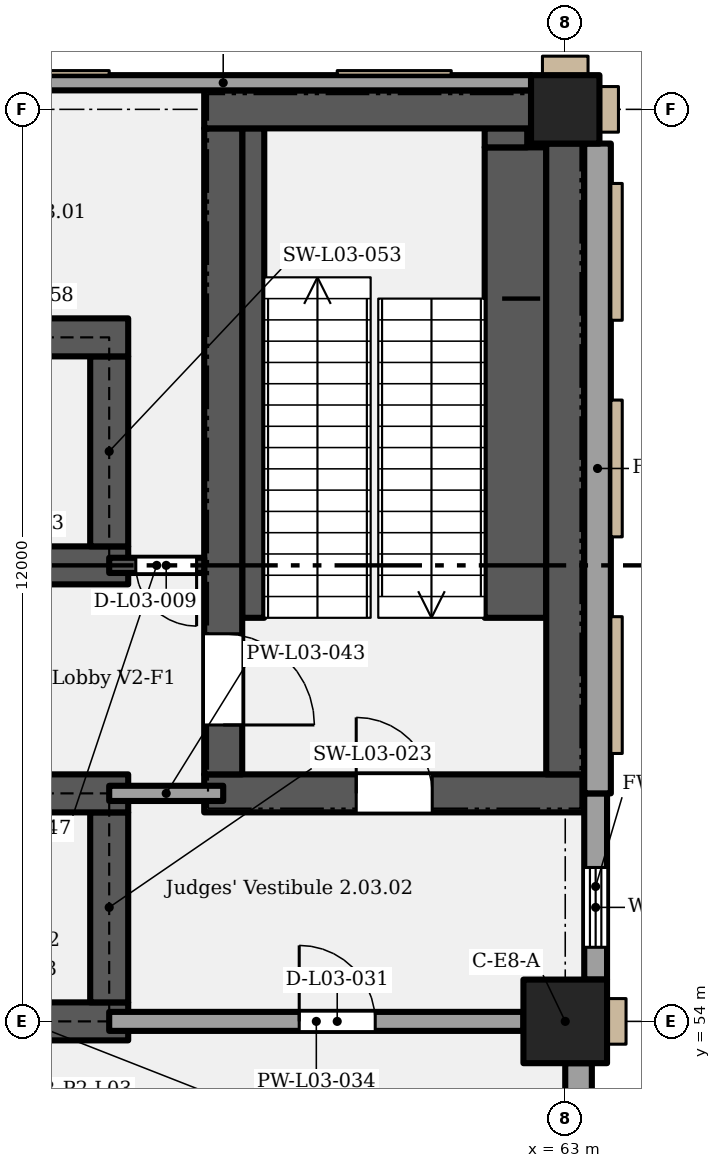
"""IFC4 building model, lengths in metres.
Left out: names, types, materials, properties, quantities, classifications, styles, units other than length and angle.
Written with IfcOpenShell. Run it as: python <this file> out.ifc"""

import sys

from ifc_helpers import new_model, si_unit, direction, frame, frame_2d, origin, origin_2d, place, context, subcontext, project, spatial, rectangle, extrude, element, fill, save


model = new_model("IFC4")
c1 = context("Model", 3, precision=1e-05, world=origin(), true_north=direction((0.0, 1.0)))
c2 = subcontext(c1, "Body", "Model", "MODEL_VIEW")
j1 = project(units=[si_unit("LENGTHUNIT", "METRE"), si_unit("PLANEANGLEUNIT", "RADIAN")], contexts=[c1])
p1 = place(None, origin())
s1 = spatial("IfcSite", under=j1, at=p1, CompositionType="ELEMENT")
p2 = place(p1, origin())
s2 = spatial("IfcBuilding", under=s1, at=p2, CompositionType="ELEMENT")
p3 = place(p2, frame((0.0, 0.0, 17.4)))
s3 = spatial("IfcBuildingStorey", under=s2, at=p3, CompositionType="ELEMENT", Elevation=17.4)
p4 = place(p3, frame((63.0, 54.0, 0.0), z_axis=(0.0, 0.0, 1.0), x_axis=(1.0, 0.0, 0.0)))
e1 = element("IfcColumn", 1, at=p4, inside=s3, PredefinedType="COLUMN", context=c2, shape_type="SweptSolid", body=[
    extrude(rectangle(XDim=1.1, YDim=1.1, at=origin_2d()), origin(), (0.0, 0.0, 1.0), 5.4),
])
p5 = place(p3, frame((63.0, 66.0, 0.0), z_axis=(0.0, 0.0, 1.0), x_axis=(1.0, 0.0, 0.0)))
e2 = element("IfcColumn", 2, at=p5, inside=s3, PredefinedType="COLUMN", context=c2, shape_type="SweptSolid", body=[
    extrude(rectangle(XDim=0.9, YDim=0.9, at=origin_2d()), origin(), (0.0, 0.0, 1.0), 5.4),
])
p6 = place(p3, frame((54.55, 54.0, 0.0), z_axis=(0.0, 0.0, 1.0), x_axis=(1.0, 0.0, 0.0)))
e3 = element("IfcWall", 3, at=p6, inside=s3, PredefinedType="SHEAR", context=c2, shape_type="SweptSolid", body=[
    extrude(rectangle(XDim=2.7, YDim=0.5, at=frame_2d((1.35, 0.0))), origin(), (0.0, 0.0, 1.0), 5.15),
])
p7 = place(p3, frame((57.0, 54.25, 0.0), z_axis=(0.0, 0.0, 1.0), x_axis=(0.0, 1.0, 0.0)))
e4 = element("IfcWall", 4, at=p7, inside=s3, PredefinedType="SHEAR", context=c2, shape_type="SweptSolid", body=[
    extrude(rectangle(XDim=2.5, YDim=0.5, at=frame_2d((1.25, 0.0))), origin(), (0.0, 0.0, 1.0), 5.15),
])
p8 = place(p3, frame((46.25, 57.0, 0.0), z_axis=(0.0, 0.0, 1.0), x_axis=(1.0, 0.0, 0.0)))
e5 = element("IfcWall", 5, at=p8, inside=s3, PredefinedType="SHEAR", context=c2, shape_type="SweptSolid", body=[
    extrude(rectangle(XDim=11.0, YDim=0.5, at=frame_2d((5.5, 0.0))), origin(), (0.0, 0.0, 1.0), 5.15),
])
p9 = place(p8, frame((4.9, 0.0, 0.0)))
e6 = element("IfcOpeningElement", 6, at=p9, cuts=e5, PredefinedType="OPENING", context=c2, shape_type="SweptSolid", body=[
    extrude(rectangle(XDim=1.2, YDim=2.1, at=frame_2d((0.6, 1.05))), frame((0.0, 0.26, 0.0), z_axis=(0.0, -1.0, 0.0), x_axis=(1.0, 0.0, 0.0)), (0.0, 0.0, 1.0), 0.52),
])
p10 = place(p3, frame((58.25, 57.0, 0.0), z_axis=(0.0, 0.0, 1.0), x_axis=(1.0, 0.0, 0.0)))
e7 = element("IfcWall", 7, at=p10, inside=s3, PredefinedType="SHEAR", context=c2, shape_type="SweptSolid", body=[
    extrude(rectangle(XDim=5.0, YDim=0.5, at=frame_2d((2.5, 0.0))), origin(), (0.0, 0.0, 1.0), 5.15),
])
p11 = place(p10, frame((2.0, 0.0, 0.0)))
e8 = element("IfcOpeningElement", 8, at=p11, cuts=e7, PredefinedType="OPENING", context=c2, shape_type="SweptSolid", body=[
    extrude(rectangle(XDim=1.0, YDim=2.1, at=frame_2d((0.5, 1.05))), frame((0.0, 0.26, 0.0), z_axis=(0.0, -1.0, 0.0), x_axis=(1.0, 0.0, 0.0)), (0.0, 0.0, 1.0), 0.52),
])
p12 = place(p3, frame((58.5, 57.25, 0.0), z_axis=(0.0, 0.0, 1.0), x_axis=(0.0, 1.0, 0.0)))
e9 = element("IfcWall", 9, at=p12, inside=s3, PredefinedType="SHEAR", context=c2, shape_type="SweptSolid", body=[
    extrude(rectangle(XDim=8.5, YDim=0.5, at=frame_2d((4.25, 0.0))), origin(), (0.0, 0.0, 1.0), 5.15),
])
p13 = place(p12, frame((1.85, 0.0, 0.0), z_axis=(0.0, 0.0, 1.0), x_axis=(-1.0, 0.0, 0.0)))
e10 = element("IfcOpeningElement", 10, at=p13, cuts=e9, PredefinedType="OPENING", context=c2, shape_type="SweptSolid", body=[
    extrude(rectangle(XDim=1.2, YDim=2.1, at=frame_2d((0.6, 1.05))), frame((0.0, 0.26, 0.0), z_axis=(0.0, -1.0, 0.0), x_axis=(1.0, 0.0, 0.0)), (0.0, 0.0, 1.0), 0.52),
])
p14 = place(p3, frame((63.0, 57.25, 0.0), z_axis=(0.0, 0.0, 1.0), x_axis=(0.0, 1.0, 0.0)))
e11 = element("IfcWall", 11, at=p14, inside=s3, PredefinedType="SHEAR", context=c2, shape_type="SweptSolid", body=[
    extrude(rectangle(XDim=8.3, YDim=0.5, at=frame_2d((4.15, 0.0))), origin(), (0.0, 0.0, 1.0), 5.15),
])
p15 = place(p3, frame((54.25, 60.0, 0.0), z_axis=(0.0, 0.0, 1.0), x_axis=(1.0, 0.0, 0.0)))
e12 = element("IfcWall", 12, at=p15, inside=s3, PredefinedType="SHEAR", context=c2, shape_type="SweptSolid", body=[
    extrude(rectangle(XDim=3.0, YDim=0.5, at=frame_2d((1.5, 0.0))), origin(), (0.0, 0.0, 1.0), 5.15),
])
p16 = place(p15, frame((0.7, 0.0, 0.0)))
e13 = element("IfcOpeningElement", 13, at=p16, cuts=e12, PredefinedType="OPENING", context=c2, shape_type="SweptSolid", body=[
    extrude(rectangle(XDim=1.1, YDim=2.1, at=frame_2d((0.55, 1.05))), frame((0.0, 0.26, 0.0), z_axis=(0.0, -1.0, 0.0), x_axis=(1.0, 0.0, 0.0)), (0.0, 0.0, 1.0), 0.52),
])
p17 = place(p3, frame((57.0, 60.25, 0.0), z_axis=(0.0, 0.0, 1.0), x_axis=(0.0, 1.0, 0.0)))
e14 = element("IfcWall", 14, at=p17, inside=s3, PredefinedType="SHEAR", context=c2, shape_type="SweptSolid", body=[
    extrude(rectangle(XDim=2.5, YDim=0.5, at=frame_2d((1.25, 0.0))), origin(), (0.0, 0.0, 1.0), 5.15),
])
p18 = place(p3, frame((54.25, 63.0, 0.0), z_axis=(0.0, 0.0, 1.0), x_axis=(1.0, 0.0, 0.0)))
e15 = element("IfcWall", 15, at=p18, inside=s3, PredefinedType="SHEAR", context=c2, shape_type="SweptSolid", body=[
    extrude(rectangle(XDim=3.0, YDim=0.5, at=frame_2d((1.5, 0.0))), origin(), (0.0, 0.0, 1.0), 5.15),
])
p19 = place(p3, frame((58.25, 66.0, 0.0), z_axis=(0.0, 0.0, 1.0), x_axis=(1.0, 0.0, 0.0)))
e16 = element("IfcWall", 16, at=p19, inside=s3, PredefinedType="SHEAR", context=c2, shape_type="SweptSolid", body=[
    extrude(rectangle(XDim=4.3, YDim=0.5, at=frame_2d((2.15, 0.0))), origin(), (0.0, 0.0, 1.0), 5.15),
])
p20 = place(p3, frame((54.45, 66.35, 0.0), z_axis=(0.0, 0.0, 1.0), x_axis=(1.0, 0.0, 0.0)))
e17 = element("IfcWall", 17, at=p20, inside=s3, PredefinedType="SOLIDWALL", context=c2, shape_type="SweptSolid", body=[
    extrude(rectangle(XDim=8.1, YDim=0.2, at=frame_2d((4.05, 0.0))), origin(), (0.0, 0.0, 1.0), 5.15),
])
p21 = place(p3, frame((63.175, 38.05, 0.0), z_axis=(0.0, 0.0, 1.0), x_axis=(0.0, 1.0, 0.0)))
e18 = element("IfcWall", 18, at=p21, inside=s3, PredefinedType="SOLIDWALL", context=c2, shape_type="SweptSolid", body=[
    extrude(rectangle(XDim=15.4, YDim=0.35, at=frame_2d((7.7, 0.0))), origin(), (0.0, 0.0, 1.0), 5.15),
])
p22 = place(p21, frame((0.35, 0.0, 1.05)))
e19 = element("IfcOpeningElement", 19, at=p22, cuts=e18, PredefinedType="OPENING", context=c2, shape_type="SweptSolid", body=[
    extrude(rectangle(XDim=1.5, YDim=3.5, at=frame_2d((0.75, 1.75))), frame((0.0, 0.185, 0.0), z_axis=(0.0, -1.0, 0.0), x_axis=(1.0, 0.0, 0.0)), (0.0, 0.0, 1.0), 0.37),
])
p23 = place(p21, frame((3.65, 0.0, 1.05)))
e20 = element("IfcOpeningElement", 20, at=p23, cuts=e18, PredefinedType="OPENING", context=c2, shape_type="SweptSolid", body=[
    extrude(rectangle(XDim=1.5, YDim=3.5, at=frame_2d((0.75, 1.75))), frame((0.0, 0.185, 0.0), z_axis=(0.0, -1.0, 0.0), x_axis=(1.0, 0.0, 0.0)), (0.0, 0.0, 1.0), 0.37),
])
p24 = place(p21, frame((6.95, 0.0, 1.05)))
e21 = element("IfcOpeningElement", 21, at=p24, cuts=e18, PredefinedType="OPENING", context=c2, shape_type="SweptSolid", body=[
    extrude(rectangle(XDim=1.5, YDim=3.5, at=frame_2d((0.75, 1.75))), frame((0.0, 0.185, 0.0), z_axis=(0.0, -1.0, 0.0), x_axis=(1.0, 0.0, 0.0)), (0.0, 0.0, 1.0), 0.37),
])
p25 = place(p21, frame((10.25, 0.0, 1.05)))
e22 = element("IfcOpeningElement", 22, at=p25, cuts=e18, PredefinedType="OPENING", context=c2, shape_type="SweptSolid", body=[
    extrude(rectangle(XDim=1.5, YDim=3.5, at=frame_2d((0.75, 1.75))), frame((0.0, 0.185, 0.0), z_axis=(0.0, -1.0, 0.0), x_axis=(1.0, 0.0, 0.0)), (0.0, 0.0, 1.0), 0.37),
])
p26 = place(p21, frame((13.55, 0.0, 1.05)))
e23 = element("IfcOpeningElement", 23, at=p26, cuts=e18, PredefinedType="OPENING", context=c2, shape_type="SweptSolid", body=[
    extrude(rectangle(XDim=1.5, YDim=3.5, at=frame_2d((0.75, 1.75))), frame((0.0, 0.185, 0.0), z_axis=(0.0, -1.0, 0.0), x_axis=(1.0, 0.0, 0.0)), (0.0, 0.0, 1.0), 0.37),
])
p27 = place(p3, frame((63.4, 54.55, 0.0), z_axis=(0.0, 0.0, 1.0), x_axis=(0.0, 1.0, 0.0)))
e24 = element("IfcWall", 24, at=p27, inside=s3, PredefinedType="SOLIDWALL", context=c2, shape_type="SweptSolid", body=[
    extrude(rectangle(XDim=2.45, YDim=0.3, at=frame_2d((1.225, 0.0))), origin(), (0.0, 0.0, 1.0), 5.15),
])
p28 = place(p27, frame((0.425, 0.0, 1.05)))
e25 = element("IfcOpeningElement", 25, at=p28, cuts=e24, PredefinedType="OPENING", context=c2, shape_type="SweptSolid", body=[
    extrude(rectangle(XDim=1.05, YDim=2.4, at=frame_2d((0.525, 1.2))), frame((0.0, 0.16, 0.0), z_axis=(0.0, -1.0, 0.0), x_axis=(1.0, 0.0, 0.0)), (0.0, 0.0, 1.0), 0.32),
])
p29 = place(p3, frame((63.425, 57.0, 0.0), z_axis=(0.0, 0.0, 1.0), x_axis=(0.0, 1.0, 0.0)))
e26 = element("IfcWall", 26, at=p29, inside=s3, PredefinedType="SOLIDWALL", context=c2, shape_type="SweptSolid", body=[
    extrude(rectangle(XDim=8.55, YDim=0.35, at=frame_2d((4.275, 0.0))), origin(), (0.0, 0.0, 1.0), 5.15),
])
p30 = place(p3, frame((57.0, 54.0, 0.0), z_axis=(0.0, 0.0, 1.0), x_axis=(1.0, 0.0, 0.0)))
e27 = element("IfcWall", 27, at=p30, inside=s3, PredefinedType="PARTITIONING", context=c2, shape_type="SweptSolid", body=[
    extrude(rectangle(XDim=5.45, YDim=0.25, at=frame_2d((2.725, 0.0))), origin(), (0.0, 0.0, 1.0), 4.4),
])
p31 = place(p30, frame((2.5, 0.0, 0.0)))
e28 = element("IfcOpeningElement", 28, at=p31, cuts=e27, PredefinedType="OPENING", context=c2, shape_type="SweptSolid", body=[
    extrude(rectangle(XDim=1.0, YDim=2.1, at=frame_2d((0.5, 1.05))), frame((0.0, 0.135, 0.0), z_axis=(0.0, -1.0, 0.0), x_axis=(1.0, 0.0, 0.0)), (0.0, 0.0, 1.0), 0.27),
])
p32 = place(p3, frame((57.0, 57.0, 0.0), z_axis=(0.0, 0.0, 1.0), x_axis=(1.0, 0.0, 0.0)))
e29 = element("IfcWall", 29, at=p32, inside=s3, PredefinedType="PARTITIONING", context=c2, shape_type="SweptSolid", body=[
    extrude(rectangle(XDim=1.5, YDim=0.2, at=frame_2d((0.75, 0.0))), origin(), (0.0, 0.0, 1.0), 5.15),
])
p33 = place(p3, frame((57.0, 60.0, 0.0), z_axis=(0.0, 0.0, 1.0), x_axis=(1.0, 0.0, 0.0)))
e30 = element("IfcWall", 30, at=p33, inside=s3, PredefinedType="SHEAR", context=c2, shape_type="SweptSolid", body=[
    extrude(rectangle(XDim=1.25, YDim=0.2, at=frame_2d((0.625, 0.0))), origin(), (0.0, 0.0, 1.0), 5.15),
])
p34 = place(p33, frame((1.15, 0.0, 0.0), z_axis=(0.0, 0.0, 1.0), x_axis=(-1.0, 0.0, 0.0)))
e31 = element("IfcOpeningElement", 31, at=p34, cuts=e30, PredefinedType="OPENING", context=c2, shape_type="SweptSolid", body=[
    extrude(rectangle(XDim=0.8, YDim=2.0, at=frame_2d((0.4, 1.0))), frame((0.0, 0.11, 0.0), z_axis=(0.0, -1.0, 0.0), x_axis=(1.0, 0.0, 0.0)), (0.0, 0.0, 1.0), 0.22),
])
p35 = place(p3, frame((58.895, 59.31, 0.0), z_axis=(0.0, 0.0, 1.0), x_axis=(0.0, 1.0, 0.0)))
e32 = element("IfcWall", 32, at=p35, inside=s3, PredefinedType="SHEAR", context=c2, shape_type="SweptSolid", body=[
    extrude(rectangle(XDim=6.44, YDim=0.29, at=frame_2d((3.22, 0.0))), origin(), (0.0, 0.0, 1.0), 2.587),
])
p36 = place(p3, frame((62.345, 59.31, 0.0), z_axis=(0.0, 0.0, 1.0), x_axis=(0.0, 1.0, 0.0)))
e33 = element("IfcWall", 33, at=p36, inside=s3, PredefinedType="SHEAR", context=c2, shape_type="SweptSolid", body=[
    extrude(rectangle(XDim=6.19, YDim=0.81, at=frame_2d((3.095, 0.0))), origin(), (0.0, 0.0, 1.0), 2.587),
])
p37 = place(p3, frame((62.22, 65.5, 0.0), z_axis=(0.0, 0.0, 1.0), x_axis=(0.0, 1.0, 0.0)))
e34 = element("IfcWall", 34, at=p37, inside=s3, PredefinedType="SHEAR", context=c2, shape_type="SweptSolid", body=[
    extrude(rectangle(XDim=0.25, YDim=0.56, at=frame_2d((0.125, 0.0))), origin(), (0.0, 0.0, 1.0), 2.587),
])
p38 = place(p28, origin())
e35 = element("IfcWindow", 35, at=p38, inside=s3, PartitioningType="SINGLE_PANEL", PredefinedType="WINDOW", context=c2, shape_type="SweptSolid", body=[
    extrude(rectangle(XDim=1.05, YDim=2.4, at=frame_2d((0.525, 1.2))), frame((0.0, 0.03, 0.0), z_axis=(0.0, -1.0, 0.0), x_axis=(1.0, 0.0, 0.0)), (0.0, 0.0, 1.0), 0.06),
])
fill(e25, e35)
p39 = place(p13, origin())
e36 = element("IfcDoor", 36, at=p39, inside=s3, OperationType="SINGLE_SWING_RIGHT", PredefinedType="DOOR", context=c2, shape_type="SweptSolid", body=[
    extrude(rectangle(XDim=1.2, YDim=2.1, at=frame_2d((0.6, 1.05))), frame((0.0, 0.025, 0.0), z_axis=(0.0, -1.0, 0.0), x_axis=(1.0, 0.0, 0.0)), (0.0, 0.0, 1.0), 0.05),
])
fill(e10, e36)
p40 = place(p34, origin())
e37 = element("IfcDoor", 37, at=p40, inside=s3, OperationType="SINGLE_SWING_LEFT", PredefinedType="DOOR", context=c2, shape_type="SweptSolid", body=[
    extrude(rectangle(XDim=0.8, YDim=2.0, at=frame_2d((0.4, 1.0))), frame((0.0, 0.025, 0.0), z_axis=(0.0, -1.0, 0.0), x_axis=(1.0, 0.0, 0.0)), (0.0, 0.0, 1.0), 0.05),
])
fill(e31, e37)
p41 = place(p11, origin())
e38 = element("IfcDoor", 38, at=p41, inside=s3, OperationType="SINGLE_SWING_LEFT", PredefinedType="DOOR", context=c2, shape_type="SweptSolid", body=[
    extrude(rectangle(XDim=1.0, YDim=2.1, at=frame_2d((0.5, 1.05))), frame((0.0, 0.025, 0.0), z_axis=(0.0, -1.0, 0.0), x_axis=(1.0, 0.0, 0.0)), (0.0, 0.0, 1.0), 0.05),
])
fill(e8, e38)
p42 = place(p31, origin())
e39 = element("IfcDoor", 39, at=p42, inside=s3, OperationType="SINGLE_SWING_LEFT", PredefinedType="DOOR", context=c2, shape_type="SweptSolid", body=[
    extrude(rectangle(XDim=1.0, YDim=2.1, at=frame_2d((0.5, 1.05))), frame((0.0, 0.025, 0.0), z_axis=(0.0, -1.0, 0.0), x_axis=(1.0, 0.0, 0.0)), (0.0, 0.0, 1.0), 0.05),
])
fill(e28, e39)
save(model, sys.argv[1])
